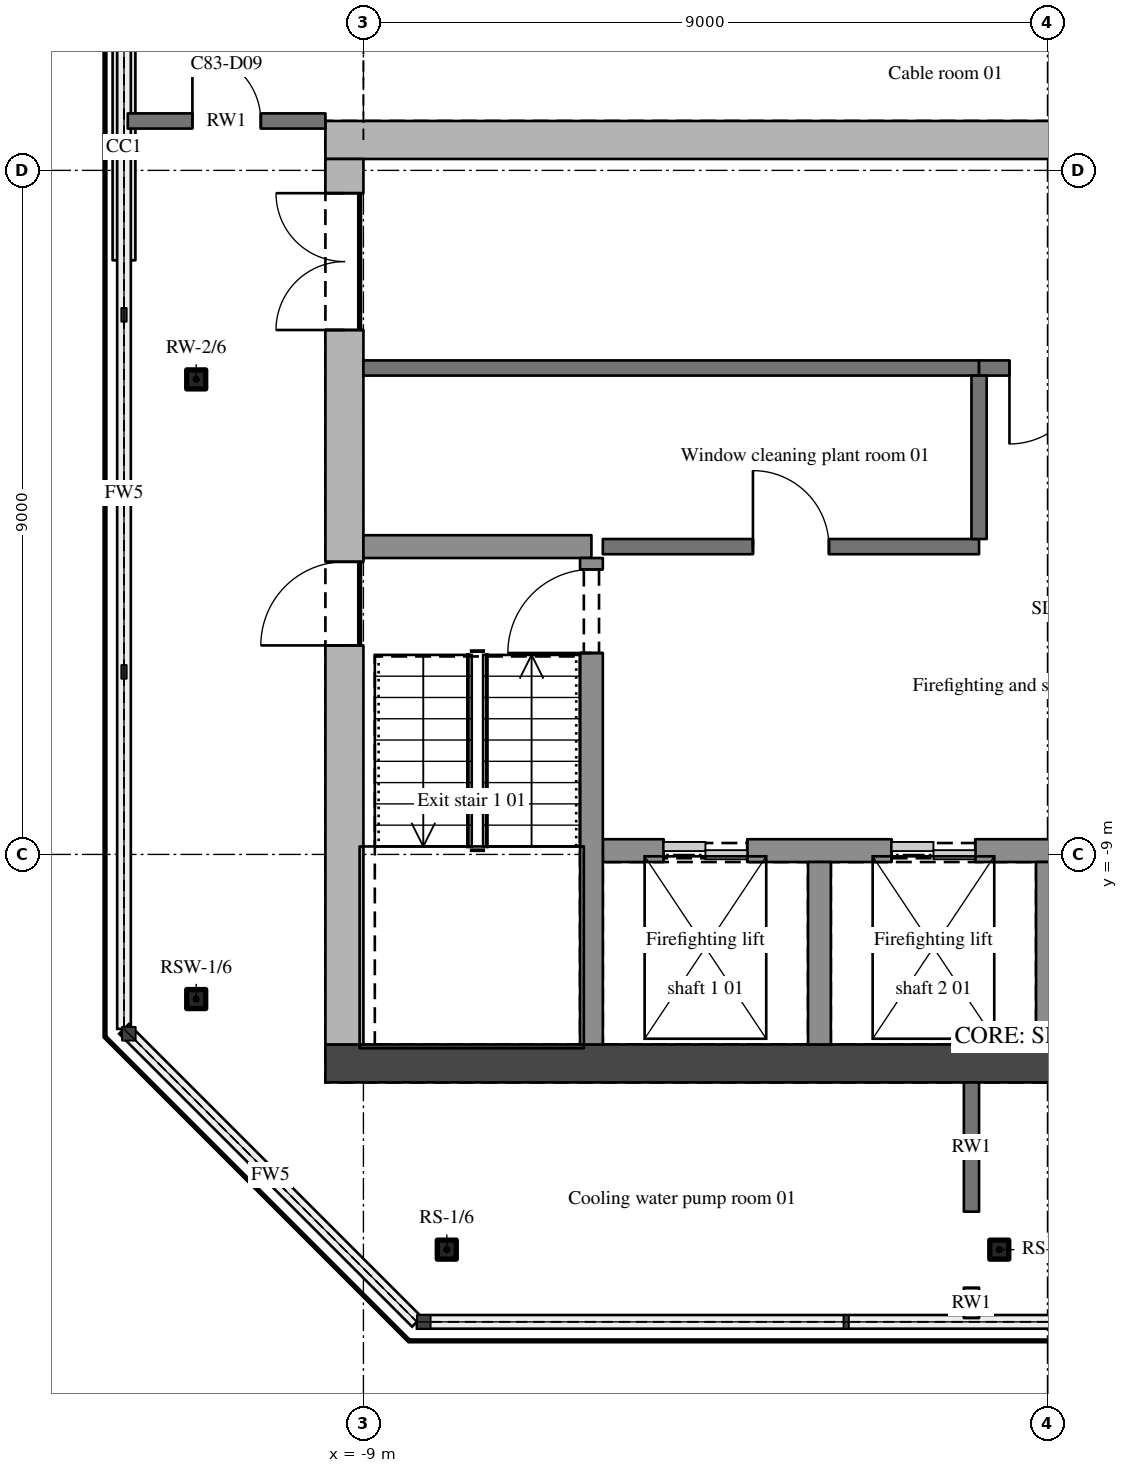
"""IFC4 building model, lengths in metres.
Left out: names, types, materials, properties, quantities, classifications, styles, units other than length and angle.
Written with IfcOpenShell. Run it as: python <this file> out.ifc"""

import sys

from ifc_helpers import new_model, si_unit, direction, frame, frame_2d, origin, origin_2d, place, context, subcontext, project, spatial, polyline, rectangle, hollow_rectangle, outline, extrude, element, fill, save


model = new_model("IFC4")
c1 = context("Model", 3, precision=1e-05, world=origin(), true_north=direction((0.0, 1.0)))
c2 = subcontext(c1, "Body", "Model", "MODEL_VIEW")
j1 = project(units=[si_unit("LENGTHUNIT", "METRE"), si_unit("PLANEANGLEUNIT", "RADIAN")], contexts=[c1])
p1 = place(None, origin())
s1 = spatial("IfcSite", under=j1, at=p1, CompositionType="ELEMENT")
p2 = place(p1, origin())
s2 = spatial("IfcBuilding", under=s1, at=p2, CompositionType="ELEMENT")
p3 = place(p2, frame((0.0, 0.0, 308.1)))
s3 = spatial("IfcBuildingStorey", under=s2, at=p3, CompositionType="ELEMENT", Elevation=308.1)
for number, where, z_axis, x_axis in (
    (1, (-7.903, -14.2, 0.0), (0.0, 0.0, 1.0), (1.0, 0.0, 0.0)),
    (2, (-0.634, -14.2, 0.0), (0.0, 0.0, 1.0), (1.0, 0.0, 0.0)),
    (3, (-11.2, -2.75, 0.0), (0.0, 0.0, 1.0), (1.0, 0.0, 0.0)),
    (4, (-11.2, -10.903, 0.0), (0.0, 0.0, 1.0), (1.0, 0.0, 0.0)),
):
    element("IfcColumn", number, at=place(p3, frame(where, z_axis=z_axis, x_axis=x_axis)), inside=s3, PredefinedType="COLUMN", context=c2, shape_type="SweptSolid", body=[
        extrude(hollow_rectangle(XDim=0.25, YDim=0.25, WallThickness=0.02, InnerFilletRadius=0.03, OuterFilletRadius=0.05, at=origin_2d()), origin(), (0.0, 0.0, 1.0), 3.6),
    ])
for number, where, z_axis, x_axis in (
    (5, (-9.5, -11.75, 0.0), (0.0, 0.0, 1.0), (1.0, 0.0, 0.0)),
    (6, (-9.5, 0.4, 0.0), (0.0, 0.0, 1.0), (1.0, 0.0, 0.0)),
):
    element("IfcWall", number, at=place(p3, frame(where, z_axis=z_axis, x_axis=x_axis)), inside=s3, PredefinedType="SHEAR", context=c2, shape_type="SweptSolid", body=[
        extrude(outline(polyline([(0.0, 0.0), (19.0, 0.0), (19.0, 3.6), (0.0, 3.6), (0.0, 0.0)])), frame((0.0, 0.25, 0.0), z_axis=(0.0, -1.0, 0.0), x_axis=(1.0, 0.0, 0.0)), (0.0, 0.0, 1.0), 0.5),
    ])
p4 = place(p3, frame((-9.25, -11.5, 0.0), z_axis=(0.0, 0.0, 1.0), x_axis=(0.0, 1.0, 0.0)))
e7 = element("IfcWall", 7, at=p4, inside=s3, PredefinedType="SHEAR", context=c2, shape_type="SweptSolid", body=[
    extrude(outline(polyline([(0.0, 0.0), (11.65, 0.0), (11.65, 3.6), (0.0, 3.6), (0.0, 0.0)])), frame((0.0, 0.25, 0.0), z_axis=(0.0, -1.0, 0.0), x_axis=(1.0, 0.0, 0.0)), (0.0, 0.0, 1.0), 0.5),
])
p5 = place(p4, frame((9.4, 0.0, 0.0)))
e8 = element("IfcOpeningElement", 8, at=p5, cuts=e7, PredefinedType="OPENING", context=c2, shape_type="SweptSolid", body=[
    extrude(rectangle(XDim=1.8, YDim=2.1, at=frame_2d((0.9, 1.05))), frame((0.0, 0.26, 0.0), z_axis=(0.0, -1.0, 0.0), x_axis=(1.0, 0.0, 0.0)), (0.0, 0.0, 1.0), 0.52),
])
p6 = place(p4, frame((5.25, 0.0, 0.0)))
e9 = element("IfcOpeningElement", 9, at=p6, cuts=e7, PredefinedType="OPENING", context=c2, shape_type="SweptSolid", body=[
    extrude(rectangle(XDim=1.1, YDim=2.1, at=frame_2d((0.55, 1.05))), frame((0.0, 0.26, 0.0), z_axis=(0.0, -1.0, 0.0), x_axis=(1.0, 0.0, 0.0)), (0.0, 0.0, 1.0), 0.52),
])
p7 = place(p3, frame((-5.85, -8.95, 0.0), z_axis=(0.0, 0.0, 1.0), x_axis=(1.0, 0.0, 0.0)))
e10 = element("IfcWall", 10, at=p7, inside=s3, PredefinedType="SHEAR", context=c2, shape_type="SweptSolid", body=[
    extrude(rectangle(XDim=11.7, YDim=0.3, at=frame_2d((5.85, 0.0))), origin(), (0.0, 0.0, 1.0), 3.6),
])
p8 = place(p7, frame((0.8, 0.0, 0.0)))
e11 = element("IfcOpeningElement", 11, at=p8, cuts=e10, PredefinedType="OPENING", context=c2, shape_type="SweptSolid", body=[
    extrude(rectangle(XDim=1.1, YDim=2.1, at=frame_2d((0.55, 1.05))), frame((0.0, 0.16, 0.0), z_axis=(0.0, -1.0, 0.0), x_axis=(1.0, 0.0, 0.0)), (0.0, 0.0, 1.0), 0.32),
])
p9 = place(p7, frame((3.8, 0.0, 0.0)))
e12 = element("IfcOpeningElement", 12, at=p9, cuts=e10, PredefinedType="OPENING", context=c2, shape_type="SweptSolid", body=[
    extrude(rectangle(XDim=1.1, YDim=2.1, at=frame_2d((0.55, 1.05))), frame((0.0, 0.16, 0.0), z_axis=(0.0, -1.0, 0.0), x_axis=(1.0, 0.0, 0.0)), (0.0, 0.0, 1.0), 0.32),
])
p10 = place(p7, frame((6.8, 0.0, 0.0)))
e13 = element("IfcOpeningElement", 13, at=p10, cuts=e10, PredefinedType="OPENING", context=c2, shape_type="SweptSolid", body=[
    extrude(rectangle(XDim=1.1, YDim=2.1, at=frame_2d((0.55, 1.05))), frame((0.0, 0.16, 0.0), z_axis=(0.0, -1.0, 0.0), x_axis=(1.0, 0.0, 0.0)), (0.0, 0.0, 1.0), 0.32),
])
p11 = place(p7, frame((9.8, 0.0, 0.0)))
e14 = element("IfcOpeningElement", 14, at=p11, cuts=e10, PredefinedType="OPENING", context=c2, shape_type="SweptSolid", body=[
    extrude(rectangle(XDim=1.1, YDim=2.1, at=frame_2d((0.55, 1.05))), frame((0.0, 0.16, 0.0), z_axis=(0.0, -1.0, 0.0), x_axis=(1.0, 0.0, 0.0)), (0.0, 0.0, 1.0), 0.32),
])
p12 = place(p3, frame((-9.0, -4.95, 0.0), z_axis=(0.0, 0.0, 1.0), x_axis=(1.0, 0.0, 0.0)))
e15 = element("IfcWall", 15, at=p12, inside=s3, PredefinedType="SHEAR", context=c2, shape_type="SweptSolid", body=[
    extrude(rectangle(XDim=3.0, YDim=0.3, at=frame_2d((1.5, 0.0))), origin(), (0.0, 0.0, 1.0), 3.6),
])
p13 = place(p3, frame((-5.85, -4.95, 0.0), z_axis=(0.0, 0.0, 1.0), x_axis=(1.0, 0.0, 0.0)))
e16 = element("IfcWall", 16, at=p13, inside=s3, PredefinedType="SOLIDWALL", context=c2, shape_type="SweptSolid", body=[
    extrude(rectangle(XDim=4.95, YDim=0.2, at=frame_2d((2.475, 0.0))), origin(), (0.0, 0.0, 1.0), 3.3),
])
p14 = place(p13, frame((1.975, 0.0, 0.0)))
e17 = element("IfcOpeningElement", 17, at=p14, cuts=e16, PredefinedType="OPENING", context=c2, shape_type="SweptSolid", body=[
    extrude(rectangle(XDim=1.0, YDim=2.1, at=frame_2d((0.5, 1.05))), frame((0.0, 0.11, 0.0), z_axis=(0.0, -1.0, 0.0), x_axis=(1.0, 0.0, 0.0)), (0.0, 0.0, 1.0), 0.22),
])
p15 = place(p3, frame((-9.0, -2.6, 0.0), z_axis=(0.0, 0.0, 1.0), x_axis=(1.0, 0.0, 0.0)))
e18 = element("IfcWall", 18, at=p15, inside=s3, PredefinedType="SOLIDWALL", context=c2, shape_type="SweptSolid", body=[
    extrude(rectangle(XDim=8.1, YDim=0.2, at=frame_2d((4.05, 0.0))), origin(), (0.0, 0.0, 1.0), 2.66),
])
p16 = place(p3, frame((0.9, -2.6, 0.0), z_axis=(0.0, 0.0, 1.0), x_axis=(-1.0, 0.0, 0.0)))
e19 = element("IfcWall", 19, at=p16, inside=s3, PredefinedType="SOLIDWALL", context=c2, shape_type="SweptSolid", body=[
    extrude(rectangle(XDim=1.8, YDim=0.2, at=frame_2d((0.9, 0.0))), origin(), (0.0, 0.0, 1.0), 3.3),
])
p17 = place(p16, frame((0.4, 0.0, 0.0)))
e20 = element("IfcOpeningElement", 20, at=p17, cuts=e19, PredefinedType="OPENING", context=c2, shape_type="SweptSolid", body=[
    extrude(rectangle(XDim=1.0, YDim=2.1, at=frame_2d((0.5, 1.05))), frame((0.0, 0.11, 0.0), z_axis=(0.0, -1.0, 0.0), x_axis=(1.0, 0.0, 0.0)), (0.0, 0.0, 1.0), 0.22),
])
p18 = place(p3, frame((-12.1, 0.65, 0.0), z_axis=(0.0, 0.0, 1.0), x_axis=(1.0, 0.0, 0.0)))
e21 = element("IfcWall", 21, at=p18, inside=s3, PredefinedType="SOLIDWALL", context=c2, shape_type="SweptSolid", body=[
    extrude(rectangle(XDim=2.6, YDim=0.2, at=frame_2d((1.3, 0.0))), origin(), (0.0, 0.0, 1.0), 2.66),
])
p19 = place(p18, frame((0.85, 0.0, 0.0)))
e22 = element("IfcOpeningElement", 22, at=p19, cuts=e21, PredefinedType="OPENING", context=c2, shape_type="SweptSolid", body=[
    extrude(rectangle(XDim=0.9, YDim=2.1, at=frame_2d((0.45, 1.05))), frame((0.0, 0.11, 0.0), z_axis=(0.0, -1.0, 0.0), x_axis=(1.0, 0.0, 0.0)), (0.0, 0.0, 1.0), 0.22),
])
p20 = place(p3, frame((-6.0, -11.5, 0.0), z_axis=(0.0, 0.0, 1.0), x_axis=(0.0, 1.0, 0.0)))
e23 = element("IfcWall", 23, at=p20, inside=s3, PredefinedType="SHEAR", context=c2, shape_type="SweptSolid", body=[
    extrude(rectangle(XDim=6.4, YDim=0.3, at=frame_2d((3.2, 0.0))), origin(), (0.0, 0.0, 1.0), 3.6),
])
p21 = place(p20, frame((5.15, 0.0, 0.0)))
e24 = element("IfcOpeningElement", 24, at=p21, cuts=e23, PredefinedType="OPENING", context=c2, shape_type="SweptSolid", body=[
    extrude(rectangle(XDim=1.1, YDim=2.1, at=frame_2d((0.55, 1.05))), frame((0.0, 0.16, 0.0), z_axis=(0.0, -1.0, 0.0), x_axis=(1.0, 0.0, 0.0)), (0.0, 0.0, 1.0), 0.32),
])
p22 = place(p3, frame((-3.0, -11.5, 0.0), z_axis=(0.0, 0.0, 1.0), x_axis=(0.0, 1.0, 0.0)))
e25 = element("IfcWall", 25, at=p22, inside=s3, PredefinedType="SHEAR", context=c2, shape_type="SweptSolid", body=[
    extrude(rectangle(XDim=2.4, YDim=0.3, at=frame_2d((1.2, 0.0))), origin(), (0.0, 0.0, 1.0), 3.6),
])
p23 = place(p3, frame((-1.0, -15.1, 0.0), z_axis=(0.0, 0.0, 1.0), x_axis=(0.0, 1.0, 0.0)))
e26 = element("IfcWall", 26, at=p23, inside=s3, PredefinedType="SOLIDWALL", context=c2, shape_type="SweptSolid", body=[
    extrude(rectangle(XDim=0.4, YDim=0.2, at=frame_2d((0.2, 0.0))), origin(), (0.0, 0.0, 1.0), 2.66),
])
p24 = place(p3, frame((-1.0, -13.7, 0.0), z_axis=(0.0, 0.0, 1.0), x_axis=(0.0, 1.0, 0.0)))
e27 = element("IfcWall", 27, at=p24, inside=s3, PredefinedType="SOLIDWALL", context=c2, shape_type="SweptSolid", body=[
    extrude(rectangle(XDim=1.7, YDim=0.2, at=frame_2d((0.85, 0.0))), origin(), (0.0, 0.0, 1.0), 2.66),
])
p25 = place(p3, frame((-0.9, -4.85, 0.0), z_axis=(0.0, 0.0, 1.0), x_axis=(0.0, 1.0, 0.0)))
e28 = element("IfcWall", 28, at=p25, inside=s3, PredefinedType="SOLIDWALL", context=c2, shape_type="SweptSolid", body=[
    extrude(rectangle(XDim=2.15, YDim=0.2, at=frame_2d((1.075, 0.0))), origin(), (0.0, 0.0, 1.0), 3.3),
])
p26 = place(p3, frame((0.0, -11.5, 0.0), z_axis=(0.0, 0.0, 1.0), x_axis=(0.0, 1.0, 0.0)))
e29 = element("IfcWall", 29, at=p26, inside=s3, PredefinedType="SHEAR", context=c2, shape_type="SweptSolid", body=[
    extrude(rectangle(XDim=2.4, YDim=0.3, at=frame_2d((1.2, 0.0))), origin(), (0.0, 0.0, 1.0), 3.6),
])
p27 = place(p17, origin())
e30 = element("IfcDoor", 30, at=p27, inside=s3, OperationType="SINGLE_SWING_RIGHT", PredefinedType="DOOR", context=c2, shape_type="SweptSolid", body=[
    extrude(rectangle(XDim=1.0, YDim=2.1, at=frame_2d((0.5, 1.05))), frame((0.0, 0.025, 0.0), z_axis=(0.0, -1.0, 0.0), x_axis=(1.0, 0.0, 0.0)), (0.0, 0.0, 1.0), 0.05),
])
fill(e20, e30)
p28 = place(p5, origin())
e31 = element("IfcDoor", 31, at=p28, inside=s3, OperationType="DOUBLE_DOOR_SINGLE_SWING", PredefinedType="DOOR", context=c2, shape_type="SweptSolid", body=[
    extrude(rectangle(XDim=1.8, YDim=2.1, at=frame_2d((0.9, 1.05))), frame((0.0, 0.025, 0.0), z_axis=(0.0, -1.0, 0.0), x_axis=(1.0, 0.0, 0.0)), (0.0, 0.0, 1.0), 0.05),
])
fill(e8, e31)
p29 = place(p21, origin())
e32 = element("IfcDoor", 32, at=p29, inside=s3, OperationType="SINGLE_SWING_LEFT", PredefinedType="DOOR", context=c2, shape_type="SweptSolid", body=[
    extrude(rectangle(XDim=1.1, YDim=2.1, at=frame_2d((0.55, 1.05))), frame((0.0, 0.025, 0.0), z_axis=(0.0, -1.0, 0.0), x_axis=(1.0, 0.0, 0.0)), (0.0, 0.0, 1.0), 0.05),
])
fill(e24, e32)
p30 = place(p6, origin())
e33 = element("IfcDoor", 33, at=p30, inside=s3, OperationType="SINGLE_SWING_LEFT", PredefinedType="DOOR", context=c2, shape_type="SweptSolid", body=[
    extrude(rectangle(XDim=1.1, YDim=2.1, at=frame_2d((0.55, 1.05))), frame((0.0, 0.025, 0.0), z_axis=(0.0, -1.0, 0.0), x_axis=(1.0, 0.0, 0.0)), (0.0, 0.0, 1.0), 0.05),
])
fill(e9, e33)
p31 = place(p14, origin())
e34 = element("IfcDoor", 34, at=p31, inside=s3, OperationType="SINGLE_SWING_LEFT", PredefinedType="DOOR", context=c2, shape_type="SweptSolid", body=[
    extrude(rectangle(XDim=1.0, YDim=2.1, at=frame_2d((0.5, 1.05))), frame((0.0, 0.025, 0.0), z_axis=(0.0, -1.0, 0.0), x_axis=(1.0, 0.0, 0.0)), (0.0, 0.0, 1.0), 0.05),
])
fill(e17, e34)
p32 = place(p19, origin())
e35 = element("IfcDoor", 35, at=p32, inside=s3, OperationType="SINGLE_SWING_LEFT", PredefinedType="DOOR", context=c2, shape_type="SweptSolid", body=[
    extrude(rectangle(XDim=0.9, YDim=2.1, at=frame_2d((0.45, 1.05))), frame((0.0, 0.025, 0.0), z_axis=(0.0, -1.0, 0.0), x_axis=(1.0, 0.0, 0.0)), (0.0, 0.0, 1.0), 0.05),
])
fill(e22, e35)
p33 = place(p8, origin())
e36 = element("IfcDoor", 36, at=p33, inside=s3, OperationType="DOUBLE_DOOR_SLIDING", PredefinedType="DOOR", context=c2, shape_type="SweptSolid", body=[
    extrude(rectangle(XDim=1.1, YDim=2.1, at=frame_2d((0.55, 1.05))), frame((0.0, 0.025, 0.0), z_axis=(0.0, -1.0, 0.0), x_axis=(1.0, 0.0, 0.0)), (0.0, 0.0, 1.0), 0.05),
])
fill(e11, e36)
p34 = place(p9, origin())
e37 = element("IfcDoor", 37, at=p34, inside=s3, OperationType="DOUBLE_DOOR_SLIDING", PredefinedType="DOOR", context=c2, shape_type="SweptSolid", body=[
    extrude(rectangle(XDim=1.1, YDim=2.1, at=frame_2d((0.55, 1.05))), frame((0.0, 0.025, 0.0), z_axis=(0.0, -1.0, 0.0), x_axis=(1.0, 0.0, 0.0)), (0.0, 0.0, 1.0), 0.05),
])
fill(e12, e37)
save(model, sys.argv[1])
